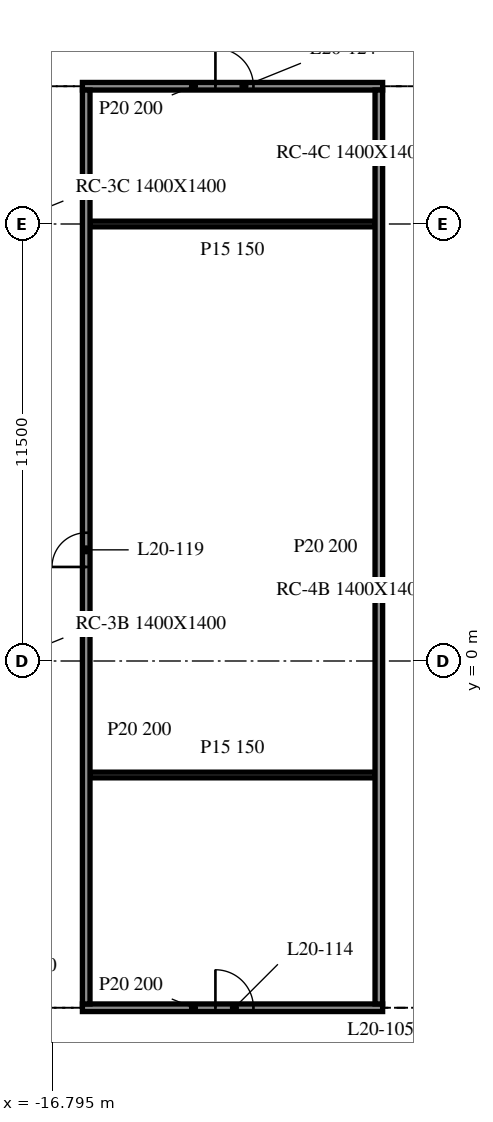
"""IFC4 building model, lengths in metres.
Left out: names, types, materials, properties, quantities, classifications, styles, units other than length and angle.
Written with IfcOpenShell. Run it as: python <this file> out.ifc"""

import sys

from ifc_helpers import new_model, si_unit, direction, frame, frame_2d, origin, place, context, subcontext, project, spatial, rectangle, extrude, element, fill, save


model = new_model("IFC4")
c1 = context("Model", 3, precision=1e-05, world=origin(), true_north=direction((0.0, 1.0)))
c2 = subcontext(c1, "Body", "Model", "MODEL_VIEW")
j1 = project(units=[si_unit("LENGTHUNIT", "METRE"), si_unit("PLANEANGLEUNIT", "RADIAN")], contexts=[c1])
p1 = place(None, origin())
s1 = spatial("IfcSite", under=j1, at=p1, CompositionType="ELEMENT")
p2 = place(p1, origin())
s2 = spatial("IfcBuilding", under=s1, at=p2, CompositionType="ELEMENT")
p3 = place(p2, frame((0.0, 0.0, 88.9)))
s3 = spatial("IfcBuildingStorey", under=s2, at=p3, CompositionType="ELEMENT", Elevation=88.9)
p4 = place(p3, frame((-16.0, -9.125, 0.0), z_axis=(0.0, 0.0, 1.0), x_axis=(1.0, 0.0, 0.0)))
e1 = element("IfcWall", 1, at=p4, inside=s3, PredefinedType="PARTITIONING", context=c2, shape_type="SweptSolid", body=[
    extrude(rectangle(XDim=7.9, YDim=0.2, at=frame_2d((3.95, 0.0))), origin(), (0.0, 0.0, 1.0), 3.76),
])
p5 = place(p4, frame((3.5, 0.0, 0.0)))
e2 = element("IfcOpeningElement", 2, at=p5, cuts=e1, PredefinedType="OPENING", context=c2, shape_type="SweptSolid", body=[
    extrude(rectangle(XDim=1.0, YDim=2.1, at=frame_2d((0.5, 1.05))), frame((0.0, 0.11, 0.0), z_axis=(0.0, -1.0, 0.0), x_axis=(1.0, 0.0, 0.0)), (0.0, 0.0, 1.0), 0.22),
])
for number, where, z_axis, x_axis in (
    (3, (-15.8, -3.0, 0.0), (0.0, 0.0, 1.0), (1.0, 0.0, 0.0)),
    (4, (-15.8, 11.5, 0.0), (0.0, 0.0, 1.0), (1.0, 0.0, 0.0)),
):
    element("IfcWall", number, at=place(p3, frame(where, z_axis=z_axis, x_axis=x_axis)), inside=s3, PredefinedType="PARTITIONING", context=c2, shape_type="SweptSolid", body=[
        extrude(rectangle(XDim=7.5, YDim=0.15, at=frame_2d((3.75, 0.0))), origin(), (0.0, 0.0, 1.0), 3.76),
    ])
p6 = place(p3, frame((-16.0, 15.125, 0.0), z_axis=(0.0, 0.0, 1.0), x_axis=(1.0, 0.0, 0.0)))
e5 = element("IfcWall", 5, at=p6, inside=s3, PredefinedType="PARTITIONING", context=c2, shape_type="SweptSolid", body=[
    extrude(rectangle(XDim=7.9, YDim=0.2, at=frame_2d((3.95, 0.0))), origin(), (0.0, 0.0, 1.0), 3.76),
])
p7 = place(p6, frame((3.5, 0.0, 0.0)))
e6 = element("IfcOpeningElement", 6, at=p7, cuts=e5, PredefinedType="OPENING", context=c2, shape_type="SweptSolid", body=[
    extrude(rectangle(XDim=1.0, YDim=2.1, at=frame_2d((0.5, 1.05))), frame((0.0, 0.11, 0.0), z_axis=(0.0, -1.0, 0.0), x_axis=(1.0, 0.0, 0.0)), (0.0, 0.0, 1.0), 0.22),
])
p8 = place(p3, frame((-15.9, -9.025, 0.0), z_axis=(0.0, 0.0, 1.0), x_axis=(0.0, 1.0, 0.0)))
e7 = element("IfcWall", 7, at=p8, inside=s3, PredefinedType="PARTITIONING", context=c2, shape_type="SweptSolid", body=[
    extrude(rectangle(XDim=24.05, YDim=0.2, at=frame_2d((12.025, 0.0))), origin(), (0.0, 0.0, 1.0), 3.76),
])
p9 = place(p8, frame((11.5, 0.0, 0.0)))
e8 = element("IfcOpeningElement", 8, at=p9, cuts=e7, PredefinedType="OPENING", context=c2, shape_type="SweptSolid", body=[
    extrude(rectangle(XDim=0.9, YDim=2.1, at=frame_2d((0.45, 1.05))), frame((0.0, 0.11, 0.0), z_axis=(0.0, -1.0, 0.0), x_axis=(1.0, 0.0, 0.0)), (0.0, 0.0, 1.0), 0.22),
])
p10 = place(p3, frame((-8.2, -9.025, 0.0), z_axis=(0.0, 0.0, 1.0), x_axis=(0.0, 1.0, 0.0)))
e9 = element("IfcWall", 9, at=p10, inside=s3, PredefinedType="PARTITIONING", context=c2, shape_type="SweptSolid", body=[
    extrude(rectangle(XDim=24.05, YDim=0.2, at=frame_2d((12.025, 0.0))), origin(), (0.0, 0.0, 1.0), 3.76),
])
p11 = place(p5, origin())
e10 = element("IfcDoor", 10, at=p11, inside=s3, OperationType="SINGLE_SWING_RIGHT", PredefinedType="DOOR", context=c2, shape_type="SweptSolid", body=[
    extrude(rectangle(XDim=1.0, YDim=2.1, at=frame_2d((0.5, 1.05))), frame((0.0, 0.025, 0.0), z_axis=(0.0, -1.0, 0.0), x_axis=(1.0, 0.0, 0.0)), (0.0, 0.0, 1.0), 0.05),
])
fill(e2, e10)
p12 = place(p9, origin())
e11 = element("IfcDoor", 11, at=p12, inside=s3, OperationType="SINGLE_SWING_RIGHT", PredefinedType="DOOR", context=c2, shape_type="SweptSolid", body=[
    extrude(rectangle(XDim=0.9, YDim=2.1, at=frame_2d((0.45, 1.05))), frame((0.0, 0.025, 0.0), z_axis=(0.0, -1.0, 0.0), x_axis=(1.0, 0.0, 0.0)), (0.0, 0.0, 1.0), 0.05),
])
fill(e8, e11)
p13 = place(p7, origin())
e12 = element("IfcDoor", 12, at=p13, inside=s3, OperationType="SINGLE_SWING_LEFT", PredefinedType="DOOR", context=c2, shape_type="SweptSolid", body=[
    extrude(rectangle(XDim=1.0, YDim=2.1, at=frame_2d((0.5, 1.05))), frame((0.0, 0.025, 0.0), z_axis=(0.0, -1.0, 0.0), x_axis=(1.0, 0.0, 0.0)), (0.0, 0.0, 1.0), 0.05),
])
fill(e6, e12)
save(model, sys.argv[1])
